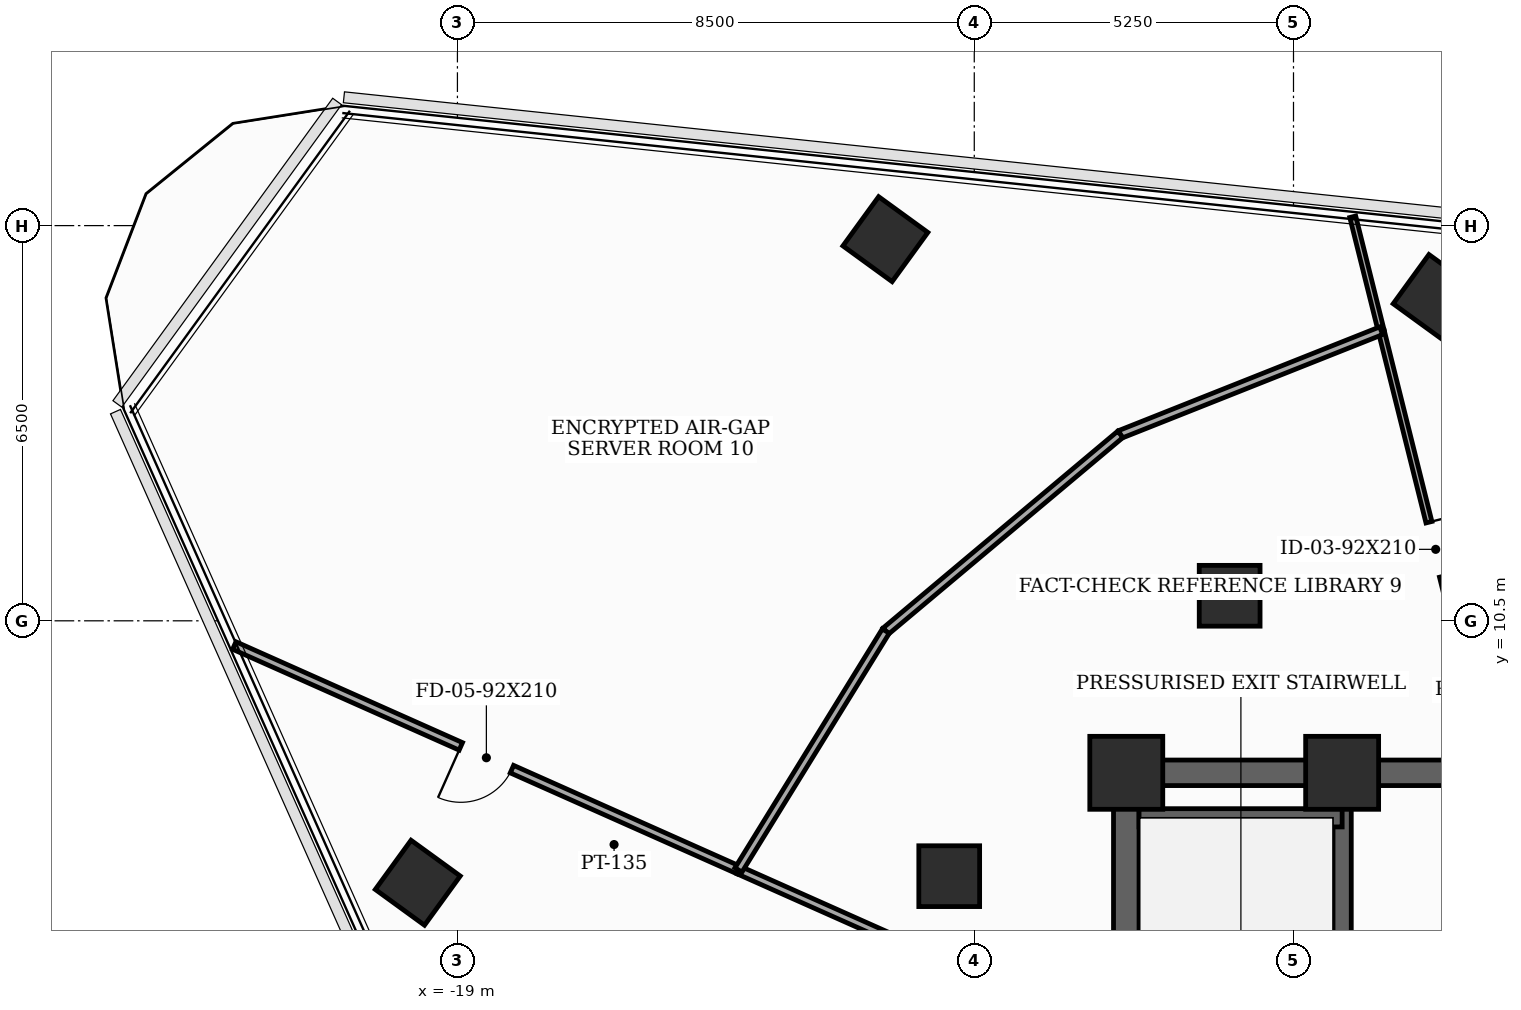
"""IFC4 building model, lengths in metres.
Left out: names, types, materials, properties, quantities, classifications, styles, units other than length and angle.
Written with IfcOpenShell. Run it as: python <this file> out.ifc"""

import sys

from ifc_helpers import new_model, si_unit, direction, frame, frame_2d, origin, origin_2d, place, context, subcontext, project, spatial, rectangle, extrude, element, fill, save


model = new_model("IFC4")
c1 = context("Model", 3, precision=1e-05, world=origin(), true_north=direction((0.0, 1.0)))
c2 = subcontext(c1, "Body", "Model", "MODEL_VIEW")
j1 = project(units=[si_unit("LENGTHUNIT", "METRE"), si_unit("PLANEANGLEUNIT", "RADIAN")], contexts=[c1])
p1 = place(None, origin())
s1 = spatial("IfcSite", under=j1, at=p1, CompositionType="ELEMENT")
p2 = place(p1, origin())
s2 = spatial("IfcBuilding", under=s1, at=p2, CompositionType="ELEMENT")
p3 = place(p2, frame((0.0, 0.0, 230.0)))
s3 = spatial("IfcBuildingStorey", under=s2, at=p3, CompositionType="ELEMENT", Elevation=230.0)
for number, where, z_axis, x_axis in (
    (1, (-4.45, 8.0, 0.0), (0.0, 0.0, 1.0), (1.0, 0.0, 0.0)),
    (2, (-8.0, 8.0, 0.0), (0.0, 0.0, 1.0), (1.0, 0.0, 0.0)),
):
    element("IfcColumn", number, at=place(p3, frame(where, z_axis=z_axis, x_axis=x_axis)), inside=s3, PredefinedType="COLUMN", context=c2, shape_type="SweptSolid", body=[
        extrude(rectangle(XDim=1.2, YDim=1.2, at=origin_2d()), origin(), (0.0, 0.0, 1.0), 3.7),
    ])
for number, where, z_axis, x_axis in (
    (3, (-6.3, 10.912, 0.0), (0.0, 0.0, 1.0), (1.0, 0.0, 0.0)),
    (4, (-10.912, 6.3, 0.0), (0.0, 0.0, 1.0), (1.0, 0.0, 0.0)),
    (5, (-2.912, 15.826, 0.0), (0.0, 0.0, 1.0), (0.588, 0.809, 0.0)),
    (6, (-11.962, 16.777, 0.0), (0.0, 0.0, 1.0), (0.588, 0.809, 0.0)),
    (7, (-19.652, 6.192, 0.0), (0.0, 0.0, 1.0), (0.588, 0.809, 0.0)),
):
    element("IfcColumn", number, at=place(p3, frame(where, z_axis=z_axis, x_axis=x_axis)), inside=s3, PredefinedType="COLUMN", context=c2, shape_type="SweptSolid", body=[
        extrude(rectangle(XDim=1.0, YDim=1.0, at=origin_2d()), origin(), (0.0, 0.0, 1.0), 3.7),
    ])
p4 = place(p3, frame((-8.0, -8.0, 0.0), z_axis=(0.0, 0.0, 1.0), x_axis=(0.0, 1.0, 0.0)))
e8 = element("IfcWall", 8, at=p4, inside=s3, PredefinedType="SHEAR", context=c2, shape_type="SweptSolid", body=[
    extrude(rectangle(XDim=16.0, YDim=0.42, at=frame_2d((8.0, 0.0))), origin(), (0.0, 0.0, 1.0), 3.5),
])
p5 = place(p4, frame((0.761, 0.0, 0.0)))
e9 = element("IfcOpeningElement", 9, at=p5, cuts=e8, PredefinedType="OPENING", context=c2, shape_type="SweptSolid", body=[
    extrude(rectangle(XDim=0.85, YDim=2.02, at=frame_2d((0.425, 1.01))), frame((0.0, 0.22, 0.0), z_axis=(0.0, -1.0, 0.0), x_axis=(1.0, 0.0, 0.0)), (0.0, 0.0, 1.0), 0.44),
])
p6 = place(p4, frame((5.35, 0.0, 0.0)))
e10 = element("IfcOpeningElement", 10, at=p6, cuts=e8, PredefinedType="OPENING", context=c2, shape_type="SweptSolid", body=[
    extrude(rectangle(XDim=1.05, YDim=2.15, at=frame_2d((0.525, 1.075))), frame((0.0, 0.22, 0.0), z_axis=(0.0, -1.0, 0.0), x_axis=(1.0, 0.0, 0.0)), (0.0, 0.0, 1.0), 0.44),
])
p7 = place(p3, frame((-8.0, 8.0, 0.0), z_axis=(0.0, 0.0, 1.0), x_axis=(1.0, 0.0, 0.0)))
e11 = element("IfcWall", 11, at=p7, inside=s3, PredefinedType="SHEAR", context=c2, shape_type="SweptSolid", body=[
    extrude(rectangle(XDim=16.0, YDim=0.42, at=frame_2d((8.0, 0.0))), origin(), (0.0, 0.0, 1.0), 3.5),
])
p8 = place(p7, frame((7.1, 0.0, 0.0)))
e12 = element("IfcOpeningElement", 12, at=p8, cuts=e11, PredefinedType="OPENING", context=c2, shape_type="SweptSolid", body=[
    extrude(rectangle(XDim=1.8, YDim=2.15, at=frame_2d((0.9, 1.075))), frame((0.0, 0.22, 0.0), z_axis=(0.0, -1.0, 0.0), x_axis=(1.0, 0.0, 0.0)), (0.0, 0.0, 1.0), 0.44),
])
p9 = place(p3, frame((-4.45, -7.79, 0.0), z_axis=(0.0, 0.0, 1.0), x_axis=(0.0, 1.0, 0.0)))
e13 = element("IfcWall", 13, at=p9, inside=s3, PredefinedType="SHEAR", context=c2, shape_type="SweptSolid", body=[
    extrude(rectangle(XDim=15.58, YDim=0.3, at=frame_2d((7.79, 0.0))), origin(), (0.0, 0.0, 1.0), 3.5),
])
p10 = place(p3, frame((-7.79, 7.26, 0.0), z_axis=(0.0, 0.0, 1.0), x_axis=(1.0, 0.0, 0.0)))
e14 = element("IfcWall", 14, at=p10, inside=s3, PredefinedType="SHEAR", context=c2, shape_type="SweptSolid", body=[
    extrude(rectangle(XDim=3.34, YDim=0.3, at=frame_2d((1.67, 0.0))), origin(), (0.0, 0.0, 1.0), 3.5),
])
p11 = place(p3, frame((-8.08, 3.597, 0.0), z_axis=(0.0, 0.0, 1.0), x_axis=(-0.913494385598, 0.40685133339, 0.0)))
e15 = element("IfcWall", 15, at=p11, inside=s3, PredefinedType="PARTITIONING", context=c2, shape_type="SweptSolid", body=[
    extrude(rectangle(XDim=6.894, YDim=0.135, at=frame_2d((3.447, 0.0))), origin(), (0.0, 0.0, 1.0), 2.885),
])
p12 = place(p3, frame((-14.378, 6.402, 0.0), z_axis=(0.0, 0.0, 1.0), x_axis=(-0.913562917951, 0.406697424315, 0.0)))
e16 = element("IfcWall", 16, at=p12, inside=s3, PredefinedType="PARTITIONING", context=c2, shape_type="SweptSolid", body=[
    extrude(rectangle(XDim=9.077, YDim=0.135, at=frame_2d((4.538, 0.0))), origin(), (0.0, 0.0, 1.0), 2.985),
])
p13 = place(p12, frame((4.078, 0.0, 0.0)))
e17 = element("IfcOpeningElement", 17, at=p13, cuts=e16, PredefinedType="OPENING", context=c2, shape_type="SweptSolid", body=[
    extrude(rectangle(XDim=0.92, YDim=2.1, at=frame_2d((0.46, 1.05))), frame((0.0, 0.077, 0.0), z_axis=(0.0, -1.0, 0.0), x_axis=(1.0, 0.0, 0.0)), (0.0, 0.0, 1.0), 0.155),
])
p14 = place(p3, frame((-3.808, 15.271, 0.0), z_axis=(0.0, 0.0, 1.0), x_axis=(0.241993010569, -0.970277992555, 0.0)))
e18 = element("IfcWall", 18, at=p14, inside=s3, PredefinedType="MOVABLE", context=c2, shape_type="SweptSolid", body=[
    extrude(rectangle(XDim=7.411, YDim=0.1, at=frame_2d((3.706, 0.0))), origin(), (0.0, 0.0, 1.0), 2.885),
])
p15 = place(p14, frame((3.246, 0.0, 0.0)))
e19 = element("IfcOpeningElement", 19, at=p15, cuts=e18, PredefinedType="OPENING", context=c2, shape_type="SweptSolid", body=[
    extrude(rectangle(XDim=0.92, YDim=2.1, at=frame_2d((0.46, 1.05))), frame((0.0, 0.06, 0.0), z_axis=(0.0, -1.0, 0.0), x_axis=(1.0, 0.0, 0.0)), (0.0, 0.0, 1.0), 0.12),
])
p16 = place(p3, frame((-4.275, 17.146, 0.0), z_axis=(0.0, 0.0, 1.0), x_axis=(0.241881394388, -0.970305823464, 0.0)))
e20 = element("IfcWall", 20, at=p16, inside=s3, PredefinedType="MOVABLE", context=c2, shape_type="SweptSolid", body=[
    extrude(rectangle(XDim=1.932, YDim=0.1, at=frame_2d((0.966, 0.0))), origin(), (0.0, 0.0, 1.0), 3.035),
])
p17 = place(p3, frame((-3.808, 15.271, 0.0), z_axis=(0.0, 0.0, 1.0), x_axis=(-0.929356809345, -0.369182774414, 0.0)))
e21 = element("IfcWall", 21, at=p17, inside=s3, PredefinedType="PARTITIONING", context=c2, shape_type="SweptSolid", body=[
    extrude(rectangle(XDim=4.616, YDim=0.135, at=frame_2d((2.308, 0.0))), origin(), (0.0, 0.0, 1.0), 3.5),
])
p18 = place(p3, frame((-8.098, 13.567, 0.0), z_axis=(0.0, 0.0, 1.0), x_axis=(-0.766114520239, -0.642704085781, 0.0)))
e22 = element("IfcWall", 22, at=p18, inside=s3, PredefinedType="PARTITIONING", context=c2, shape_type="SweptSolid", body=[
    extrude(rectangle(XDim=5.035, YDim=0.135, at=frame_2d((2.517, 0.0))), origin(), (0.0, 0.0, 1.0), 2.985),
])
p19 = place(p3, frame((-11.955, 10.331, 0.0), z_axis=(0.0, 0.0, 1.0), x_axis=(-0.524888064347, -0.851171263557, 0.0)))
e23 = element("IfcWall", 23, at=p19, inside=s3, PredefinedType="PARTITIONING", context=c2, shape_type="SweptSolid", body=[
    extrude(rectangle(XDim=4.616, YDim=0.135, at=frame_2d((2.308, 0.0))), origin(), (0.0, 0.0, 1.0), 2.985),
])
p20 = place(p13, origin())
e24 = element("IfcDoor", 24, at=p20, inside=s3, OperationType="SINGLE_SWING_RIGHT", PredefinedType="DOOR", context=c2, shape_type="SweptSolid", body=[
    extrude(rectangle(XDim=0.92, YDim=2.1, at=frame_2d((0.46, 1.05))), frame((0.0, 0.025, 0.0), z_axis=(0.0, -1.0, 0.0), x_axis=(1.0, 0.0, 0.0)), (0.0, 0.0, 1.0), 0.05),
])
fill(e17, e24)
p21 = place(p15, origin())
e25 = element("IfcDoor", 25, at=p21, inside=s3, OperationType="SINGLE_SWING_LEFT", PredefinedType="DOOR", context=c2, shape_type="SweptSolid", body=[
    extrude(rectangle(XDim=0.92, YDim=2.1, at=frame_2d((0.46, 1.05))), frame((0.0, 0.025, 0.0), z_axis=(0.0, -1.0, 0.0), x_axis=(1.0, 0.0, 0.0)), (0.0, 0.0, 1.0), 0.05),
])
fill(e19, e25)
save(model, sys.argv[1])
